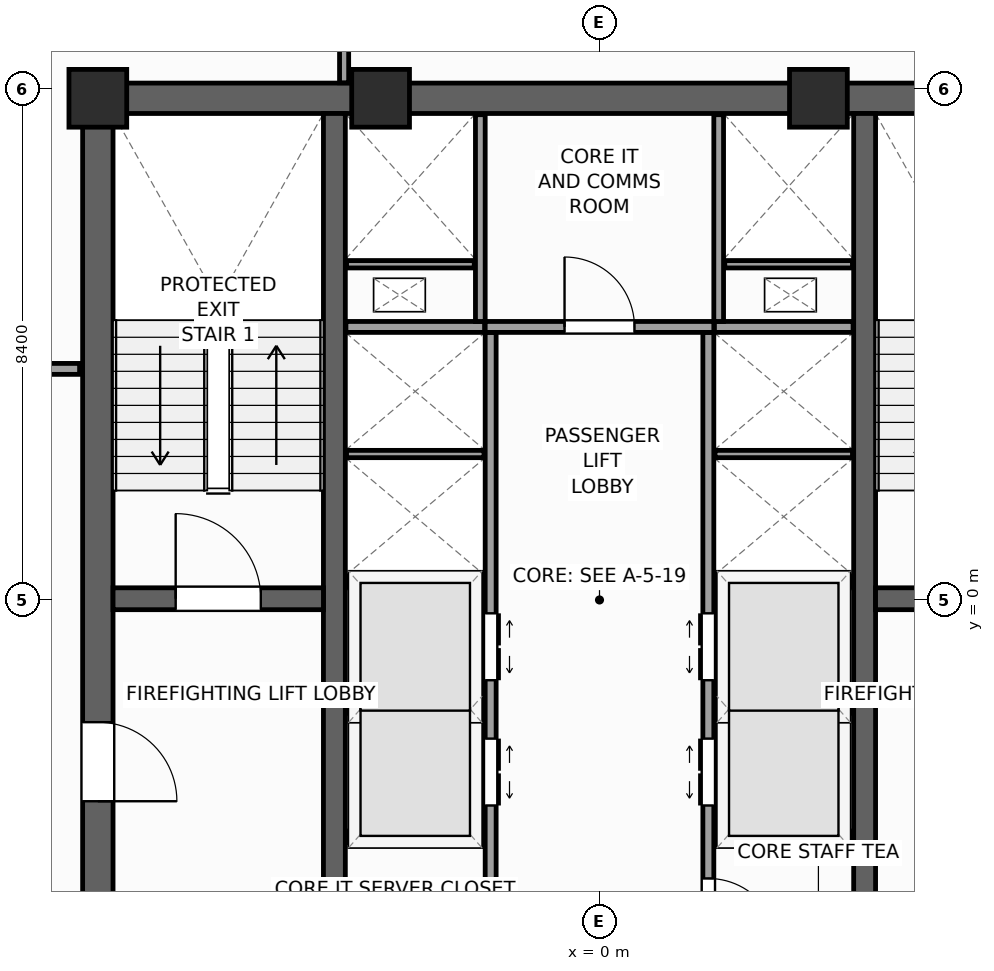
"""IFC4 building model, lengths in metres.
Left out: names, types, materials, properties, quantities, classifications, styles, units other than length and angle.
Written with IfcOpenShell. Run it as: python <this file> out.ifc"""

import sys

from ifc_helpers import new_model, si_unit, direction, frame, frame_2d, origin, origin_2d, place, context, subcontext, project, spatial, rectangle, extrude, source, transform, mapped, element, fill, save


model = new_model("IFC4")
c1 = context("Model", 3, precision=1e-05, world=origin(), true_north=direction((0.0, 1.0)))
c2 = subcontext(c1, "Body", "Model", "MODEL_VIEW")
j1 = project(units=[si_unit("LENGTHUNIT", "METRE"), si_unit("PLANEANGLEUNIT", "RADIAN")], contexts=[c1])
p1 = place(None, origin())
s1 = spatial("IfcSite", under=j1, at=p1, CompositionType="ELEMENT")
p2 = place(p1, origin())
s2 = spatial("IfcBuilding", under=s1, at=p2, CompositionType="ELEMENT")
p3 = place(p2, frame((0.0, 0.0, 217.3)))
s3 = spatial("IfcBuildingStorey", under=s2, at=p3, CompositionType="ELEMENT", Elevation=217.3)
p4 = place(p3, frame((-8.5, 8.25, 0.0), z_axis=(0.0, 0.0, 1.0), x_axis=(1.0, 0.0, 0.0)))
e1 = element("IfcWall", 1, at=p4, inside=s3, PredefinedType="SHEAR", context=c2, shape_type="SweptSolid", body=[
    extrude(rectangle(XDim=17.0, YDim=0.5, at=frame_2d((8.5, 0.0))), origin(), (0.0, 0.0, 1.0), 3.9),
])
p5 = place(p3, frame((-8.25, -8.0, 0.0), z_axis=(0.0, 0.0, 1.0), x_axis=(0.0, 1.0, 0.0)))
e2 = element("IfcWall", 2, at=p5, inside=s3, PredefinedType="SHEAR", context=c2, shape_type="SweptSolid", body=[
    extrude(rectangle(XDim=16.0, YDim=0.5, at=frame_2d((8.0, 0.0))), origin(), (0.0, 0.0, 1.0), 3.9),
])
p6 = place(p5, frame((4.69, 0.0, 0.0)))
e3 = element("IfcOpeningElement", 3, at=p6, cuts=e2, PredefinedType="OPENING", context=c2, shape_type="SweptSolid", body=[
    extrude(rectangle(XDim=1.3, YDim=2.2, at=frame_2d((0.65, 1.1))), frame((0.0, 0.26, 0.0), z_axis=(0.0, -1.0, 0.0), x_axis=(1.0, 0.0, 0.0)), (0.0, 0.0, 1.0), 0.52),
])
for number, where, z_axis, x_axis in (
    (4, (-4.36, -8.0, 0.0), (0.0, 0.0, 1.0), (0.0, 1.0, 0.0)),
    (5, (4.36, -8.0, 0.0), (0.0, 0.0, 1.0), (0.0, 1.0, 0.0)),
):
    element("IfcWall", number, at=place(p3, frame(where, z_axis=z_axis, x_axis=x_axis)), inside=s3, PredefinedType="SHEAR", context=c2, shape_type="SweptSolid", body=[
        extrude(rectangle(XDim=16.0, YDim=0.36, at=frame_2d((8.0, 0.0))), origin(), (0.0, 0.0, 1.0), 3.9),
    ])
p7 = place(p3, frame((-8.0, 0.02, 0.0), z_axis=(0.0, 0.0, 1.0), x_axis=(1.0, 0.0, 0.0)))
e6 = element("IfcWall", 6, at=p7, inside=s3, PredefinedType="SHEAR", context=c2, shape_type="SweptSolid", body=[
    extrude(rectangle(XDim=3.46, YDim=0.36, at=frame_2d((1.73, 0.0))), origin(), (0.0, 0.0, 1.0), 3.9),
])
p8 = place(p7, frame((1.03, 0.0, 0.0)))
e7 = element("IfcOpeningElement", 7, at=p8, cuts=e6, PredefinedType="OPENING", context=c2, shape_type="SweptSolid", body=[
    extrude(rectangle(XDim=1.4, YDim=2.2, at=frame_2d((0.7, 1.1))), frame((0.0, 0.19, 0.0), z_axis=(0.0, -1.0, 0.0), x_axis=(1.0, 0.0, 0.0)), (0.0, 0.0, 1.0), 0.38),
])
p9 = place(p3, frame((4.54, 0.02, 0.0), z_axis=(0.0, 0.0, 1.0), x_axis=(1.0, 0.0, 0.0)))
e8 = element("IfcWall", 8, at=p9, inside=s3, PredefinedType="SHEAR", context=c2, shape_type="SweptSolid", body=[
    extrude(rectangle(XDim=3.46, YDim=0.36, at=frame_2d((1.73, 0.0))), origin(), (0.0, 0.0, 1.0), 3.9),
])
p10 = place(p9, frame((1.03, 0.0, 0.0)))
e9 = element("IfcOpeningElement", 9, at=p10, cuts=e8, PredefinedType="OPENING", context=c2, shape_type="SweptSolid", body=[
    extrude(rectangle(XDim=1.4, YDim=2.2, at=frame_2d((0.7, 1.1))), frame((0.0, 0.19, 0.0), z_axis=(0.0, -1.0, 0.0), x_axis=(1.0, 0.0, 0.0)), (0.0, 0.0, 1.0), 0.38),
])
m1 = source(origin(), c2, "Body", "SweptSolid", [
    extrude(rectangle(XDim=0.95, YDim=0.95, at=origin_2d()), origin(), (0.0, 0.0, 1.0), 3.9),
])
for number, where, z_axis, x_axis in (
    (10, (-8.25, 8.25, 0.0), (0.0, 0.0, 1.0), (1.0, 0.0, 0.0)),
    (11, (-3.6, 8.25, 0.0), (0.0, 0.0, 1.0), (1.0, 0.0, 0.0)),
    (12, (3.6, 8.25, 0.0), (0.0, 0.0, 1.0), (1.0, 0.0, 0.0)),
):
    element("IfcColumn", number, at=place(p3, frame(where, z_axis=z_axis, x_axis=x_axis)), inside=s3, PredefinedType="PILASTER", context=c2, shape_type="MappedRepresentation", body=[
        mapped(m1, transform((0.0, 0.0, 0.0), scale=1.0)),
    ])
p11 = place(p3, frame((29.154, 6.733, 0.0), z_axis=(0.0, 0.0, 1.0), x_axis=(-0.77714192302, 0.629325378072, 0.0)))
e13 = element("IfcWall", 13, at=p11, inside=s3, PredefinedType="STANDARD", context=c2, shape_type="SweptSolid", body=[
    extrude(rectangle(XDim=36.84, YDim=0.34, at=frame_2d((18.42, 0.0))), origin(), (0.0, 0.0, 1.0), 2.96),
])
p12 = place(p11, frame((23.495, 0.0, 0.0)))
e14 = element("IfcOpeningElement", 14, at=p12, cuts=e13, PredefinedType="OPENING", context=c2, shape_type="SweptSolid", body=[
    extrude(rectangle(XDim=1.05, YDim=2.25, at=frame_2d((0.525, 1.125))), frame((0.0, 0.18, 0.0), z_axis=(0.0, -1.0, 0.0), x_axis=(1.0, 0.0, 0.0)), (0.0, 0.0, 1.0), 0.36),
])
p13 = place(p11, frame((3.721, 0.0, 0.48)))
e15 = element("IfcOpeningElement", 15, at=p13, cuts=e13, PredefinedType="OPENING", context=c2, shape_type="SweptSolid", body=[
    extrude(rectangle(XDim=1.4, YDim=2.4, at=frame_2d((0.7, 1.2))), frame((0.0, 0.18, 0.0), z_axis=(0.0, -1.0, 0.0), x_axis=(1.0, 0.0, 0.0)), (0.0, 0.0, 1.0), 0.36),
])
p14 = place(p11, frame((9.809, 0.0, 0.58)))
e16 = element("IfcOpeningElement", 16, at=p14, cuts=e13, PredefinedType="OPENING", context=c2, shape_type="SweptSolid", body=[
    extrude(rectangle(XDim=1.75, YDim=2.3, at=frame_2d((0.875, 1.15))), frame((0.0, 0.18, 0.0), z_axis=(0.0, -1.0, 0.0), x_axis=(1.0, 0.0, 0.0)), (0.0, 0.0, 1.0), 0.36),
])
p15 = place(p11, frame((16.058, 0.0, 0.58)))
e17 = element("IfcOpeningElement", 17, at=p15, cuts=e13, PredefinedType="OPENING", context=c2, shape_type="SweptSolid", body=[
    extrude(rectangle(XDim=1.75, YDim=2.3, at=frame_2d((0.875, 1.15))), frame((0.0, 0.18, 0.0), z_axis=(0.0, -1.0, 0.0), x_axis=(1.0, 0.0, 0.0)), (0.0, 0.0, 1.0), 0.36),
])
p16 = place(p11, frame((25.676, 0.0, 0.58)))
e18 = element("IfcOpeningElement", 18, at=p16, cuts=e13, PredefinedType="OPENING", context=c2, shape_type="SweptSolid", body=[
    extrude(rectangle(XDim=1.75, YDim=2.3, at=frame_2d((0.875, 1.15))), frame((0.0, 0.18, 0.0), z_axis=(0.0, -1.0, 0.0), x_axis=(1.0, 0.0, 0.0)), (0.0, 0.0, 1.0), 0.36),
])
p17 = place(p11, frame((30.982, 0.0, 0.48)))
e19 = element("IfcOpeningElement", 19, at=p17, cuts=e13, PredefinedType="OPENING", context=c2, shape_type="SweptSolid", body=[
    extrude(rectangle(XDim=1.4, YDim=2.4, at=frame_2d((0.7, 1.2))), frame((0.0, 0.18, 0.0), z_axis=(0.0, -1.0, 0.0), x_axis=(1.0, 0.0, 0.0)), (0.0, 0.0, 1.0), 0.36),
])
p18 = place(p3, frame((-6.733, 29.154, 0.0), z_axis=(0.0, 0.0, 1.0), x_axis=(-0.629325378072, -0.77714192302, 0.0)))
e20 = element("IfcWall", 20, at=p18, inside=s3, PredefinedType="STANDARD", context=c2, shape_type="SweptSolid", body=[
    extrude(rectangle(XDim=36.84, YDim=0.34, at=frame_2d((18.42, 0.0))), origin(), (0.0, 0.0, 1.0), 2.96),
])
p19 = place(p18, frame((3.721, 0.0, 0.48)))
e21 = element("IfcOpeningElement", 21, at=p19, cuts=e20, PredefinedType="OPENING", context=c2, shape_type="SweptSolid", body=[
    extrude(rectangle(XDim=1.4, YDim=2.4, at=frame_2d((0.7, 1.2))), frame((0.0, 0.18, 0.0), z_axis=(0.0, -1.0, 0.0), x_axis=(1.0, 0.0, 0.0)), (0.0, 0.0, 1.0), 0.36),
])
p20 = place(p18, frame((9.809, 0.0, 0.58)))
e22 = element("IfcOpeningElement", 22, at=p20, cuts=e20, PredefinedType="OPENING", context=c2, shape_type="SweptSolid", body=[
    extrude(rectangle(XDim=1.75, YDim=2.3, at=frame_2d((0.875, 1.15))), frame((0.0, 0.18, 0.0), z_axis=(0.0, -1.0, 0.0), x_axis=(1.0, 0.0, 0.0)), (0.0, 0.0, 1.0), 0.36),
])
p21 = place(p18, frame((16.058, 0.0, 0.58)))
e23 = element("IfcOpeningElement", 23, at=p21, cuts=e20, PredefinedType="OPENING", context=c2, shape_type="SweptSolid", body=[
    extrude(rectangle(XDim=1.75, YDim=2.3, at=frame_2d((0.875, 1.15))), frame((0.0, 0.18, 0.0), z_axis=(0.0, -1.0, 0.0), x_axis=(1.0, 0.0, 0.0)), (0.0, 0.0, 1.0), 0.36),
])
p22 = place(p18, frame((24.176, 0.0, 0.58)))
e24 = element("IfcOpeningElement", 24, at=p22, cuts=e20, PredefinedType="OPENING", context=c2, shape_type="SweptSolid", body=[
    extrude(rectangle(XDim=1.75, YDim=2.3, at=frame_2d((0.875, 1.15))), frame((0.0, 0.18, 0.0), z_axis=(0.0, -1.0, 0.0), x_axis=(1.0, 0.0, 0.0)), (0.0, 0.0, 1.0), 0.36),
])
p23 = place(p18, frame((30.232, 0.0, 0.48)))
e25 = element("IfcOpeningElement", 25, at=p23, cuts=e20, PredefinedType="OPENING", context=c2, shape_type="SweptSolid", body=[
    extrude(rectangle(XDim=1.4, YDim=2.4, at=frame_2d((0.7, 1.2))), frame((0.0, 0.18, 0.0), z_axis=(0.0, -1.0, 0.0), x_axis=(1.0, 0.0, 0.0)), (0.0, 0.0, 1.0), 0.36),
])
p24 = place(p3, frame((-1.79, -7.98, 0.0), z_axis=(0.0, 0.0, 1.0), x_axis=(0.0, 1.0, 0.0)))
e26 = element("IfcWall", 26, at=p24, inside=s3, PredefinedType="PARTITIONING", context=c2, shape_type="SweptSolid", body=[
    extrude(rectangle(XDim=12.38, YDim=0.18, at=frame_2d((6.19, 0.0))), origin(), (0.0, 0.0, 1.0), 3.66),
])
p25 = place(p24, frame((4.6, 0.0, 0.0)))
e27 = element("IfcOpeningElement", 27, at=p25, cuts=e26, PredefinedType="OPENING", context=c2, shape_type="SweptSolid", body=[
    extrude(rectangle(XDim=1.1, YDim=2.2, at=frame_2d((0.55, 1.1))), frame((0.0, 0.1, 0.0), z_axis=(0.0, -1.0, 0.0), x_axis=(1.0, 0.0, 0.0)), (0.0, 0.0, 1.0), 0.2),
])
p26 = place(p24, frame((6.66, 0.0, 0.0)))
e28 = element("IfcOpeningElement", 28, at=p26, cuts=e26, PredefinedType="OPENING", context=c2, shape_type="SweptSolid", body=[
    extrude(rectangle(XDim=1.1, YDim=2.2, at=frame_2d((0.55, 1.1))), frame((0.0, 0.1, 0.0), z_axis=(0.0, -1.0, 0.0), x_axis=(1.0, 0.0, 0.0)), (0.0, 0.0, 1.0), 0.2),
])
p27 = place(p24, frame((1.4, 0.0, 0.0)))
e29 = element("IfcOpeningElement", 29, at=p27, cuts=e26, PredefinedType="OPENING", context=c2, shape_type="SweptSolid", body=[
    extrude(rectangle(XDim=1.15, YDim=2.25, at=frame_2d((0.575, 1.125))), frame((0.0, 0.1, 0.0), z_axis=(0.0, -1.0, 0.0), x_axis=(1.0, 0.0, 0.0)), (0.0, 0.0, 1.0), 0.2),
])
p28 = place(p3, frame((1.79, -7.98, 0.0), z_axis=(0.0, 0.0, 1.0), x_axis=(0.0, 1.0, 0.0)))
e30 = element("IfcWall", 30, at=p28, inside=s3, PredefinedType="PARTITIONING", context=c2, shape_type="SweptSolid", body=[
    extrude(rectangle(XDim=12.38, YDim=0.18, at=frame_2d((6.19, 0.0))), origin(), (0.0, 0.0, 1.0), 3.66),
])
p29 = place(p28, frame((4.6, 0.0, 0.0)))
e31 = element("IfcOpeningElement", 31, at=p29, cuts=e30, PredefinedType="OPENING", context=c2, shape_type="SweptSolid", body=[
    extrude(rectangle(XDim=1.1, YDim=2.2, at=frame_2d((0.55, 1.1))), frame((0.0, 0.1, 0.0), z_axis=(0.0, -1.0, 0.0), x_axis=(1.0, 0.0, 0.0)), (0.0, 0.0, 1.0), 0.2),
])
p30 = place(p28, frame((6.66, 0.0, 0.0)))
e32 = element("IfcOpeningElement", 32, at=p30, cuts=e30, PredefinedType="OPENING", context=c2, shape_type="SweptSolid", body=[
    extrude(rectangle(XDim=1.1, YDim=2.2, at=frame_2d((0.55, 1.1))), frame((0.0, 0.1, 0.0), z_axis=(0.0, -1.0, 0.0), x_axis=(1.0, 0.0, 0.0)), (0.0, 0.0, 1.0), 0.2),
])
p31 = place(p28, frame((0.35, 0.0, 0.0)))
e33 = element("IfcOpeningElement", 33, at=p31, cuts=e30, PredefinedType="OPENING", context=c2, shape_type="SweptSolid", body=[
    extrude(rectangle(XDim=0.88, YDim=2.1, at=frame_2d((0.44, 1.05))), frame((0.0, 0.1, 0.0), z_axis=(0.0, -1.0, 0.0), x_axis=(1.0, 0.0, 0.0)), (0.0, 0.0, 1.0), 0.2),
])
p32 = place(p28, frame((2.25, 0.0, 0.0)))
e34 = element("IfcOpeningElement", 34, at=p32, cuts=e30, PredefinedType="OPENING", context=c2, shape_type="SweptSolid", body=[
    extrude(rectangle(XDim=1.15, YDim=2.25, at=frame_2d((0.575, 1.125))), frame((0.0, 0.1, 0.0), z_axis=(0.0, -1.0, 0.0), x_axis=(1.0, 0.0, 0.0)), (0.0, 0.0, 1.0), 0.2),
])
p33 = place(p3, frame((-1.88, 4.49, 0.0), z_axis=(0.0, 0.0, 1.0), x_axis=(1.0, 0.0, 0.0)))
e35 = element("IfcWall", 35, at=p33, inside=s3, PredefinedType="PARTITIONING", context=c2, shape_type="SweptSolid", body=[
    extrude(rectangle(XDim=3.76, YDim=0.18, at=frame_2d((1.88, 0.0))), origin(), (0.0, 0.0, 1.0), 3.66),
])
p34 = place(p33, frame((1.305, 0.0, 0.0)))
e36 = element("IfcOpeningElement", 36, at=p34, cuts=e35, PredefinedType="OPENING", context=c2, shape_type="SweptSolid", body=[
    extrude(rectangle(XDim=1.15, YDim=2.25, at=frame_2d((0.575, 1.125))), frame((0.0, 0.1, 0.0), z_axis=(0.0, -1.0, 0.0), x_axis=(1.0, 0.0, 0.0)), (0.0, 0.0, 1.0), 0.2),
])
for number, where, z_axis, x_axis in (
    (37, (-4.17, -3.9, 0.0), (0.0, 0.0, 1.0), (1.0, 0.0, 0.0)),
    (38, (1.89, -3.9, 0.0), (0.0, 0.0, 1.0), (1.0, 0.0, 0.0)),
    (39, (-4.17, 0.3, 0.0), (0.0, 0.0, 1.0), (1.0, 0.0, 0.0)),
    (40, (1.89, 0.3, 0.0), (0.0, 0.0, 1.0), (1.0, 0.0, 0.0)),
    (41, (-4.17, 4.49, 0.0), (0.0, 0.0, 1.0), (1.0, 0.0, 0.0)),
    (42, (1.89, 4.49, 0.0), (0.0, 0.0, 1.0), (1.0, 0.0, 0.0)),
):
    element("IfcWall", number, at=place(p3, frame(where, z_axis=z_axis, x_axis=x_axis)), inside=s3, PredefinedType="PARTITIONING", context=c2, shape_type="SweptSolid", body=[
        extrude(rectangle(XDim=2.28, YDim=0.18, at=frame_2d((1.14, 0.0))), origin(), (0.0, 0.0, 1.0), 3.66),
    ])
for number, where, z_axis, x_axis in (
    (43, (-4.16, -1.8, 0.0), (0.0, 0.0, 1.0), (1.0, 0.0, 0.0)),
    (44, (1.9, -1.8, 0.0), (0.0, 0.0, 1.0), (1.0, 0.0, 0.0)),
    (45, (-4.16, 2.4, 0.0), (0.0, 0.0, 1.0), (1.0, 0.0, 0.0)),
    (46, (1.9, 2.4, 0.0), (0.0, 0.0, 1.0), (1.0, 0.0, 0.0)),
):
    element("IfcWall", number, at=place(p3, frame(where, z_axis=z_axis, x_axis=x_axis)), inside=s3, PredefinedType="PARTITIONING", context=c2, shape_type="SweptSolid", body=[
        extrude(rectangle(XDim=2.26, YDim=0.12, at=frame_2d((1.13, 0.0))), origin(), (0.0, 0.0, 1.0), 3.66),
    ])
for number, where, z_axis, x_axis in (
    (47, (-1.96, 4.58, 0.0), (0.0, 0.0, 1.0), (0.0, 1.0, 0.0)),
    (48, (1.96, 4.58, 0.0), (0.0, 0.0, 1.0), (0.0, 1.0, 0.0)),
):
    element("IfcWall", number, at=place(p3, frame(where, z_axis=z_axis, x_axis=x_axis)), inside=s3, PredefinedType="PARTITIONING", context=c2, shape_type="SweptSolid", body=[
        extrude(rectangle(XDim=3.4, YDim=0.16, at=frame_2d((1.7, 0.0))), origin(), (0.0, 0.0, 1.0), 3.66),
    ])
for number, where, z_axis, x_axis in (
    (49, (-4.16, 5.52, 0.0), (0.0, 0.0, 1.0), (1.0, 0.0, 0.0)),
    (50, (2.06, 5.52, 0.0), (0.0, 0.0, 1.0), (1.0, 0.0, 0.0)),
):
    element("IfcWall", number, at=place(p3, frame(where, z_axis=z_axis, x_axis=x_axis)), inside=s3, PredefinedType="PARTITIONING", context=c2, shape_type="SweptSolid", body=[
        extrude(rectangle(XDim=2.1, YDim=0.12, at=frame_2d((1.05, 0.0))), origin(), (0.0, 0.0, 1.0), 3.66),
    ])
p35 = place(p3, frame((-11.4, 3.8, 0.0), z_axis=(0.0, 0.0, 1.0), x_axis=(1.0, 0.0, 0.0)))
e51 = element("IfcWall", 51, at=p35, inside=s3, PredefinedType="PARTITIONING", context=c2, shape_type="SweptSolid", body=[
    extrude(rectangle(XDim=2.85, YDim=0.18, at=frame_2d((1.425, 0.0))), origin(), (0.0, 0.0, 1.0), 3.66),
])
p36 = place(p35, frame((0.875, 0.0, 0.0)))
e52 = element("IfcOpeningElement", 52, at=p36, cuts=e51, PredefinedType="OPENING", context=c2, shape_type="SweptSolid", body=[
    extrude(rectangle(XDim=1.1, YDim=2.2, at=frame_2d((0.55, 1.1))), frame((0.0, 0.1, 0.0), z_axis=(0.0, -1.0, 0.0), x_axis=(1.0, 0.0, 0.0)), (0.0, 0.0, 1.0), 0.2),
])
p37 = place(p3, frame((-4.2, 8.505, 0.0), z_axis=(0.0, 0.0, 1.0), x_axis=(0.0, 1.0, 0.0)))
e53 = element("IfcWall", 53, at=p37, inside=s3, PredefinedType="PARTITIONING", context=c2, shape_type="SweptSolid", body=[
    extrude(rectangle(XDim=18.026, YDim=0.15, at=frame_2d((9.013, 0.0))), origin(), (0.0, 0.0, 1.0), 3.66),
])
m2 = source(origin(), c2, "Body", "SweptSolid", [
    extrude(rectangle(XDim=1.4, YDim=2.2, at=frame_2d((0.7, 1.1))), frame((0.0, 0.025, 0.0), z_axis=(0.0, -1.0, 0.0), x_axis=(1.0, 0.0, 0.0)), (0.0, 0.0, 1.0), 0.05),
])
p38 = place(p8, origin())
e54 = element("IfcDoor", 54, at=p38, inside=s3, OperationType="SINGLE_SWING_LEFT", PredefinedType="DOOR", context=c2, shape_type="MappedRepresentation", body=[
    mapped(m2, transform((0.0, 0.0, 0.0), scale=1.0)),
])
fill(e7, e54)
m3 = source(origin(), c2, "Body", "SweptSolid", [
    extrude(rectangle(XDim=1.3, YDim=2.2, at=frame_2d((0.65, 1.1))), frame((0.0, 0.025, 0.0), z_axis=(0.0, -1.0, 0.0), x_axis=(1.0, 0.0, 0.0)), (0.0, 0.0, 1.0), 0.05),
])
p39 = place(p6, frame((1.3, 0.0, 0.0), z_axis=(0.0, 0.0, 1.0), x_axis=(-1.0, 0.0, 0.0)))
e55 = element("IfcDoor", 55, at=p39, inside=s3, OperationType="SINGLE_SWING_LEFT", PredefinedType="DOOR", context=c2, shape_type="MappedRepresentation", body=[
    mapped(m3, transform((0.0, 0.0, 0.0), scale=1.0)),
])
fill(e3, e55)
m4 = source(origin(), c2, "Body", "SweptSolid", [
    extrude(rectangle(XDim=1.1, YDim=2.2, at=frame_2d((0.55, 1.1))), frame((0.0, 0.025, 0.0), z_axis=(0.0, -1.0, 0.0), x_axis=(1.0, 0.0, 0.0)), (0.0, 0.0, 1.0), 0.05),
])
p40 = place(p25, frame((1.1, 0.0, 0.0), z_axis=(0.0, 0.0, 1.0), x_axis=(-1.0, 0.0, 0.0)))
e56 = element("IfcDoor", 56, at=p40, inside=s3, OperationType="DOUBLE_DOOR_SLIDING", PredefinedType="DOOR", context=c2, shape_type="MappedRepresentation", body=[
    mapped(m4, transform((0.0, 0.0, 0.0), scale=1.0)),
])
fill(e27, e56)
p41 = place(p26, frame((1.1, 0.0, 0.0), z_axis=(0.0, 0.0, 1.0), x_axis=(-1.0, 0.0, 0.0)))
e57 = element("IfcDoor", 57, at=p41, inside=s3, OperationType="DOUBLE_DOOR_SLIDING", PredefinedType="DOOR", context=c2, shape_type="MappedRepresentation", body=[
    mapped(m4, transform((0.0, 0.0, 0.0), scale=1.0)),
])
fill(e28, e57)
p42 = place(p29, origin())
e58 = element("IfcDoor", 58, at=p42, inside=s3, OperationType="DOUBLE_DOOR_SLIDING", PredefinedType="DOOR", context=c2, shape_type="MappedRepresentation", body=[
    mapped(m4, transform((0.0, 0.0, 0.0), scale=1.0)),
])
fill(e31, e58)
p43 = place(p30, origin())
e59 = element("IfcDoor", 59, at=p43, inside=s3, OperationType="DOUBLE_DOOR_SLIDING", PredefinedType="DOOR", context=c2, shape_type="MappedRepresentation", body=[
    mapped(m4, transform((0.0, 0.0, 0.0), scale=1.0)),
])
fill(e32, e59)
m5 = source(origin(), c2, "Body", "SweptSolid", [
    extrude(rectangle(XDim=1.15, YDim=2.25, at=frame_2d((0.575, 1.125))), frame((0.0, 0.025, 0.0), z_axis=(0.0, -1.0, 0.0), x_axis=(1.0, 0.0, 0.0)), (0.0, 0.0, 1.0), 0.05),
])
p44 = place(p32, frame((1.15, 0.0, 0.0), z_axis=(0.0, 0.0, 1.0), x_axis=(-1.0, 0.0, 0.0)))
e60 = element("IfcDoor", 60, at=p44, inside=s3, OperationType="SINGLE_SWING_LEFT", PredefinedType="DOOR", context=c2, shape_type="MappedRepresentation", body=[
    mapped(m5, transform((0.0, 0.0, 0.0), scale=1.0)),
])
fill(e34, e60)
p45 = place(p34, origin())
e61 = element("IfcDoor", 61, at=p45, inside=s3, OperationType="SINGLE_SWING_LEFT", PredefinedType="DOOR", context=c2, shape_type="MappedRepresentation", body=[
    mapped(m5, transform((0.0, 0.0, 0.0), scale=1.0)),
])
fill(e36, e61)
save(model, sys.argv[1])
